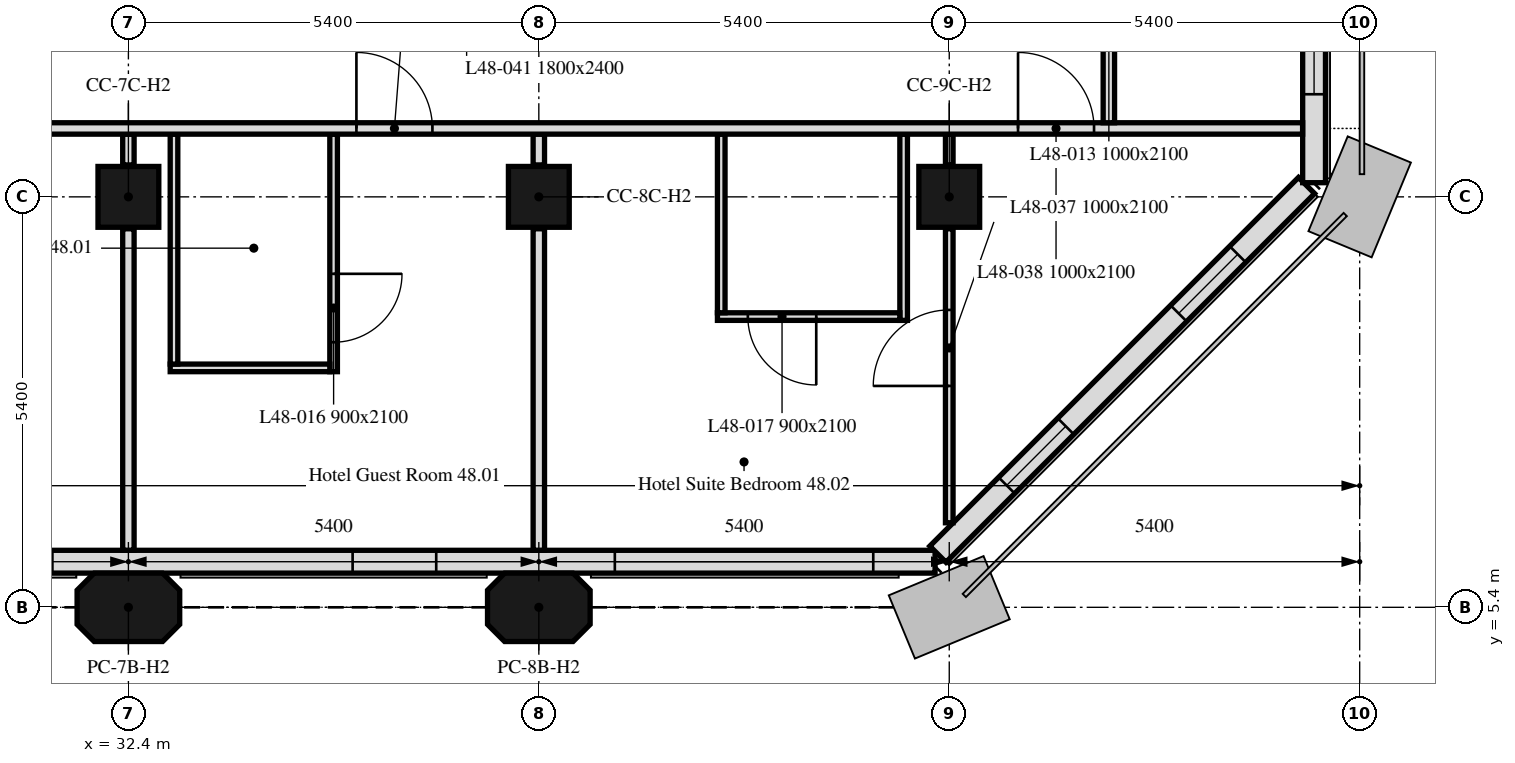
"""IFC4 building model, lengths in metres.
Left out: names, types, materials, properties, quantities, classifications, styles, units other than length and angle.
Written with IfcOpenShell. Run it as: python <this file> out.ifc"""

import sys

from ifc_helpers import new_model, si_unit, direction, frame, frame_2d, origin, origin_2d, place, context, subcontext, project, spatial, polyline, rectangle, outline, extrude, element, fill, save


model = new_model("IFC4")
c1 = context("Model", 3, precision=1e-05, world=origin(), true_north=direction((0.0, 1.0)))
c2 = subcontext(c1, "Body", "Model", "MODEL_VIEW")
j1 = project(units=[si_unit("LENGTHUNIT", "METRE"), si_unit("PLANEANGLEUNIT", "RADIAN")], contexts=[c1])
p1 = place(None, origin())
s1 = spatial("IfcSite", under=j1, at=p1, CompositionType="ELEMENT")
p2 = place(p1, origin())
s2 = spatial("IfcBuilding", under=s1, at=p2, CompositionType="ELEMENT")
p3 = place(p2, frame((0.0, 0.0, 197.2)))
s3 = spatial("IfcBuildingStorey", under=s2, at=p3, CompositionType="ELEMENT", Elevation=197.2)
for number, where, z_axis, x_axis in (
    (1, (32.4, 5.4, 0.0), (0.0, 0.0, 1.0), (1.0, 0.0, 0.0)),
    (2, (37.8, 5.4, 0.0), (0.0, 0.0, 1.0), (1.0, 0.0, 0.0)),
):
    element("IfcColumn", number, at=place(p3, frame(where, z_axis=z_axis, x_axis=x_axis)), inside=s3, PredefinedType="COLUMN", context=c2, shape_type="SweptSolid", body=[
        extrude(outline(polyline([(-0.45, -0.45), (0.45, -0.45), (0.675, -0.225), (0.675, 0.225), (0.45, 0.45), (-0.45, 0.45), (-0.675, 0.225), (-0.675, -0.225), (-0.45, -0.45)])), origin(), (0.0, 0.0, 1.0), 3.0),
    ])
for number, where, z_axis, x_axis in (
    (3, (32.4, 10.8, 0.0), (0.0, 0.0, 1.0), (1.0, 0.0, 0.0)),
    (4, (37.8, 10.8, 0.0), (0.0, 0.0, 1.0), (1.0, 0.0, 0.0)),
    (5, (43.2, 10.8, 0.0), (0.0, 0.0, 1.0), (1.0, 0.0, 0.0)),
):
    element("IfcColumn", number, at=place(p3, frame(where, z_axis=z_axis, x_axis=x_axis)), inside=s3, PredefinedType="COLUMN", context=c2, shape_type="SweptSolid", body=[
        extrude(rectangle(XDim=0.8, YDim=0.8, at=origin_2d()), origin(), (0.0, 0.0, 1.0), 3.0),
    ])
p4 = place(p3, frame((10.986, 6.0, 0.0), z_axis=(0.0, 0.0, 1.0), x_axis=(1.0, 0.0, 0.0)))
e6 = element("IfcWall", 6, at=p4, inside=s3, PredefinedType="SOLIDWALL", context=c2, shape_type="SweptSolid", body=[
    extrude(rectangle(XDim=32.027, YDim=0.3, at=frame_2d((16.014, 0.0))), origin(), (0.0, 0.0, 1.0), 3.0),
])
p5 = place(p4, frame((2.764, 0.0, 0.9)))
e7 = element("IfcOpeningElement", 7, at=p5, cuts=e6, PredefinedType="OPENING", context=c2, shape_type="SweptSolid", body=[
    extrude(rectangle(XDim=1.1, YDim=1.7, at=frame_2d((0.55, 0.85))), frame((0.0, 0.16, 0.0), z_axis=(0.0, -1.0, 0.0), x_axis=(1.0, 0.0, 0.0)), (0.0, 0.0, 1.0), 0.32),
])
p6 = place(p4, frame((6.214, 0.0, 0.9)))
e8 = element("IfcOpeningElement", 8, at=p6, cuts=e6, PredefinedType="OPENING", context=c2, shape_type="SweptSolid", body=[
    extrude(rectangle(XDim=3.4, YDim=1.7, at=frame_2d((1.7, 0.85))), frame((0.0, 0.16, 0.0), z_axis=(0.0, -1.0, 0.0), x_axis=(1.0, 0.0, 0.0)), (0.0, 0.0, 1.0), 0.32),
])
p7 = place(p4, frame((13.564, 0.0, 0.9)))
e9 = element("IfcOpeningElement", 9, at=p7, cuts=e6, PredefinedType="OPENING", context=c2, shape_type="SweptSolid", body=[
    extrude(rectangle(XDim=1.1, YDim=1.7, at=frame_2d((0.55, 0.85))), frame((0.0, 0.16, 0.0), z_axis=(0.0, -1.0, 0.0), x_axis=(1.0, 0.0, 0.0)), (0.0, 0.0, 1.0), 0.32),
])
p8 = place(p4, frame((17.014, 0.0, 0.9)))
e10 = element("IfcOpeningElement", 10, at=p8, cuts=e6, PredefinedType="OPENING", context=c2, shape_type="SweptSolid", body=[
    extrude(rectangle(XDim=3.4, YDim=1.7, at=frame_2d((1.7, 0.85))), frame((0.0, 0.16, 0.0), z_axis=(0.0, -1.0, 0.0), x_axis=(1.0, 0.0, 0.0)), (0.0, 0.0, 1.0), 0.32),
])
p9 = place(p4, frame((24.364, 0.0, 0.9)))
e11 = element("IfcOpeningElement", 11, at=p9, cuts=e6, PredefinedType="OPENING", context=c2, shape_type="SweptSolid", body=[
    extrude(rectangle(XDim=1.1, YDim=1.7, at=frame_2d((0.55, 0.85))), frame((0.0, 0.16, 0.0), z_axis=(0.0, -1.0, 0.0), x_axis=(1.0, 0.0, 0.0)), (0.0, 0.0, 1.0), 0.32),
])
p10 = place(p4, frame((27.814, 0.0, 0.9)))
e12 = element("IfcOpeningElement", 12, at=p10, cuts=e6, PredefinedType="OPENING", context=c2, shape_type="SweptSolid", body=[
    extrude(rectangle(XDim=3.4, YDim=1.7, at=frame_2d((1.7, 0.85))), frame((0.0, 0.16, 0.0), z_axis=(0.0, -1.0, 0.0), x_axis=(1.0, 0.0, 0.0)), (0.0, 0.0, 1.0), 0.32),
])
p11 = place(p3, frame((43.051, 6.099, 0.0), z_axis=(0.0, 0.0, 1.0), x_axis=(0.707106781187, 0.707106781187, 0.0)))
e13 = element("IfcWall", 13, at=p11, inside=s3, PredefinedType="SOLIDWALL", context=c2, shape_type="SweptSolid", body=[
    extrude(rectangle(XDim=6.86, YDim=0.3, at=frame_2d((3.43, 0.0))), origin(), (0.0, 0.0, 1.0), 3.0),
])
p12 = place(p11, frame((1.28, 0.0, 0.9)))
e14 = element("IfcOpeningElement", 14, at=p12, cuts=e13, PredefinedType="OPENING", context=c2, shape_type="SweptSolid", body=[
    extrude(rectangle(XDim=1.1, YDim=1.7, at=frame_2d((0.55, 0.85))), frame((0.0, 0.16, 0.0), z_axis=(0.0, -1.0, 0.0), x_axis=(1.0, 0.0, 0.0)), (0.0, 0.0, 1.0), 0.32),
])
p13 = place(p11, frame((4.48, 0.0, 0.9)))
e15 = element("IfcOpeningElement", 15, at=p13, cuts=e13, PredefinedType="OPENING", context=c2, shape_type="SweptSolid", body=[
    extrude(rectangle(XDim=1.1, YDim=1.7, at=frame_2d((0.55, 0.85))), frame((0.0, 0.16, 0.0), z_axis=(0.0, -1.0, 0.0), x_axis=(1.0, 0.0, 0.0)), (0.0, 0.0, 1.0), 0.32),
])
p14 = place(p3, frame((48.0, 10.986, 0.0), z_axis=(0.0, 0.0, 1.0), x_axis=(0.0, 1.0, 0.0)))
e16 = element("IfcWall", 16, at=p14, inside=s3, PredefinedType="SOLIDWALL", context=c2, shape_type="SweptSolid", body=[
    extrude(rectangle(XDim=32.027, YDim=0.3, at=frame_2d((16.014, 0.0))), origin(), (0.0, 0.0, 1.0), 3.0),
])
p15 = place(p14, frame((1.164, 0.0, 0.9)))
e17 = element("IfcOpeningElement", 17, at=p15, cuts=e16, PredefinedType="OPENING", context=c2, shape_type="SweptSolid", body=[
    extrude(rectangle(XDim=1.1, YDim=1.7, at=frame_2d((0.55, 0.85))), frame((0.0, 0.16, 0.0), z_axis=(0.0, -1.0, 0.0), x_axis=(1.0, 0.0, 0.0)), (0.0, 0.0, 1.0), 0.32),
])
p16 = place(p14, frame((2.764, 0.0, 0.9)))
e18 = element("IfcOpeningElement", 18, at=p16, cuts=e16, PredefinedType="OPENING", context=c2, shape_type="SweptSolid", body=[
    extrude(rectangle(XDim=1.1, YDim=1.7, at=frame_2d((0.55, 0.85))), frame((0.0, 0.16, 0.0), z_axis=(0.0, -1.0, 0.0), x_axis=(1.0, 0.0, 0.0)), (0.0, 0.0, 1.0), 0.32),
])
p17 = place(p14, frame((6.214, 0.0, 0.9)))
e19 = element("IfcOpeningElement", 19, at=p17, cuts=e16, PredefinedType="OPENING", context=c2, shape_type="SweptSolid", body=[
    extrude(rectangle(XDim=3.4, YDim=1.7, at=frame_2d((1.7, 0.85))), frame((0.0, 0.16, 0.0), z_axis=(0.0, -1.0, 0.0), x_axis=(1.0, 0.0, 0.0)), (0.0, 0.0, 1.0), 0.32),
])
p18 = place(p14, frame((11.964, 0.0, 0.9)))
e20 = element("IfcOpeningElement", 20, at=p18, cuts=e16, PredefinedType="OPENING", context=c2, shape_type="SweptSolid", body=[
    extrude(rectangle(XDim=1.1, YDim=1.7, at=frame_2d((0.55, 0.85))), frame((0.0, 0.16, 0.0), z_axis=(0.0, -1.0, 0.0), x_axis=(1.0, 0.0, 0.0)), (0.0, 0.0, 1.0), 0.32),
])
p19 = place(p14, frame((13.564, 0.0, 0.9)))
e21 = element("IfcOpeningElement", 21, at=p19, cuts=e16, PredefinedType="OPENING", context=c2, shape_type="SweptSolid", body=[
    extrude(rectangle(XDim=1.1, YDim=1.7, at=frame_2d((0.55, 0.85))), frame((0.0, 0.16, 0.0), z_axis=(0.0, -1.0, 0.0), x_axis=(1.0, 0.0, 0.0)), (0.0, 0.0, 1.0), 0.32),
])
p20 = place(p14, frame((17.014, 0.0, 0.9)))
e22 = element("IfcOpeningElement", 22, at=p20, cuts=e16, PredefinedType="OPENING", context=c2, shape_type="SweptSolid", body=[
    extrude(rectangle(XDim=3.4, YDim=1.7, at=frame_2d((1.7, 0.85))), frame((0.0, 0.16, 0.0), z_axis=(0.0, -1.0, 0.0), x_axis=(1.0, 0.0, 0.0)), (0.0, 0.0, 1.0), 0.32),
])
p21 = place(p14, frame((22.764, 0.0, 0.9)))
e23 = element("IfcOpeningElement", 23, at=p21, cuts=e16, PredefinedType="OPENING", context=c2, shape_type="SweptSolid", body=[
    extrude(rectangle(XDim=1.1, YDim=1.7, at=frame_2d((0.55, 0.85))), frame((0.0, 0.16, 0.0), z_axis=(0.0, -1.0, 0.0), x_axis=(1.0, 0.0, 0.0)), (0.0, 0.0, 1.0), 0.32),
])
p22 = place(p14, frame((24.364, 0.0, 0.9)))
e24 = element("IfcOpeningElement", 24, at=p22, cuts=e16, PredefinedType="OPENING", context=c2, shape_type="SweptSolid", body=[
    extrude(rectangle(XDim=1.1, YDim=1.7, at=frame_2d((0.55, 0.85))), frame((0.0, 0.16, 0.0), z_axis=(0.0, -1.0, 0.0), x_axis=(1.0, 0.0, 0.0)), (0.0, 0.0, 1.0), 0.32),
])
p23 = place(p14, frame((28.164, 0.0, 0.9)))
e25 = element("IfcOpeningElement", 25, at=p23, cuts=e16, PredefinedType="OPENING", context=c2, shape_type="SweptSolid", body=[
    extrude(rectangle(XDim=1.1, YDim=1.7, at=frame_2d((0.55, 0.85))), frame((0.0, 0.16, 0.0), z_axis=(0.0, -1.0, 0.0), x_axis=(1.0, 0.0, 0.0)), (0.0, 0.0, 1.0), 0.32),
])
p24 = place(p14, frame((29.589, 0.0, 0.9)))
e26 = element("IfcOpeningElement", 26, at=p24, cuts=e16, PredefinedType="OPENING", context=c2, shape_type="SweptSolid", body=[
    extrude(rectangle(XDim=0.65, YDim=1.7, at=frame_2d((0.325, 0.85))), frame((0.0, 0.16, 0.0), z_axis=(0.0, -1.0, 0.0), x_axis=(1.0, 0.0, 0.0)), (0.0, 0.0, 1.0), 0.32),
])
p25 = place(p3, frame((32.4, 6.151, 0.0), z_axis=(0.0, 0.0, 1.0), x_axis=(0.0, 1.0, 0.0)))
e27 = element("IfcWall", 27, at=p25, inside=s3, PredefinedType="PARTITIONING", context=c2, shape_type="SweptSolid", body=[
    extrude(rectangle(XDim=4.229, YDim=0.15, at=frame_2d((2.115, 0.0))), origin(), (0.0, 0.0, 1.0), 3.0),
])
p26 = place(p3, frame((32.4, 11.22, 0.0), z_axis=(0.0, 0.0, 1.0), x_axis=(0.0, 1.0, 0.0)))
e28 = element("IfcWall", 28, at=p26, inside=s3, PredefinedType="PARTITIONING", context=c2, shape_type="SweptSolid", body=[
    extrude(rectangle(XDim=0.405, YDim=0.15, at=frame_2d((0.203, 0.0))), origin(), (0.0, 0.0, 1.0), 3.0),
])
p27 = place(p3, frame((37.8, 6.151, 0.0), z_axis=(0.0, 0.0, 1.0), x_axis=(0.0, 1.0, 0.0)))
e29 = element("IfcWall", 29, at=p27, inside=s3, PredefinedType="PARTITIONING", context=c2, shape_type="SweptSolid", body=[
    extrude(rectangle(XDim=4.229, YDim=0.15, at=frame_2d((2.115, 0.0))), origin(), (0.0, 0.0, 1.0), 3.0),
])
p28 = place(p3, frame((37.8, 11.22, 0.0), z_axis=(0.0, 0.0, 1.0), x_axis=(0.0, 1.0, 0.0)))
e30 = element("IfcWall", 30, at=p28, inside=s3, PredefinedType="PARTITIONING", context=c2, shape_type="SweptSolid", body=[
    extrude(rectangle(XDim=0.405, YDim=0.15, at=frame_2d((0.203, 0.0))), origin(), (0.0, 0.0, 1.0), 3.0),
])
p29 = place(p3, frame((35.1, 11.625, 0.0), z_axis=(0.0, 0.0, 1.0), x_axis=(0.0, -1.0, 0.0)))
e31 = element("IfcWall", 31, at=p29, inside=s3, PredefinedType="PARTITIONING", context=c2, shape_type="SweptSolid", body=[
    extrude(rectangle(XDim=3.125, YDim=0.1, at=frame_2d((1.562, 0.0))), origin(), (0.0, 0.0, 1.0), 3.0),
])
p30 = place(p29, frame((1.837, 0.0, 0.0)))
e32 = element("IfcOpeningElement", 32, at=p30, cuts=e31, PredefinedType="OPENING", context=c2, shape_type="SweptSolid", body=[
    extrude(rectangle(XDim=0.9, YDim=2.1, at=frame_2d((0.45, 1.05))), frame((0.0, 0.05, 0.0), z_axis=(0.0, -1.0, 0.0), x_axis=(1.0, 0.0, 0.0)), (0.0, 0.0, 1.0), 0.1),
])
p31 = place(p3, frame((35.05, 8.55, 0.0), z_axis=(0.0, 0.0, 1.0), x_axis=(-1.0, 0.0, 0.0)))
e33 = element("IfcWall", 33, at=p31, inside=s3, PredefinedType="PARTITIONING", context=c2, shape_type="SweptSolid", body=[
    extrude(rectangle(XDim=2.1, YDim=0.1, at=frame_2d((1.05, 0.0))), origin(), (0.0, 0.0, 1.0), 3.0),
])
p32 = place(p3, frame((33.0, 8.6, 0.0), z_axis=(0.0, 0.0, 1.0), x_axis=(0.0, 1.0, 0.0)))
e34 = element("IfcWall", 34, at=p32, inside=s3, PredefinedType="PARTITIONING", context=c2, shape_type="SweptSolid", body=[
    extrude(rectangle(XDim=3.025, YDim=0.1, at=frame_2d((1.512, 0.0))), origin(), (0.0, 0.0, 1.0), 3.0),
])
p33 = place(p3, frame((43.2, 6.512, 0.0), z_axis=(0.0, 0.0, 1.0), x_axis=(0.0, 1.0, 0.0)))
e35 = element("IfcWall", 35, at=p33, inside=s3, PredefinedType="PARTITIONING", context=c2, shape_type="SweptSolid", body=[
    extrude(rectangle(XDim=3.868, YDim=0.1, at=frame_2d((1.934, 0.0))), origin(), (0.0, 0.0, 1.0), 3.0),
])
p34 = place(p33, frame((1.8, 0.0, 0.0)))
e36 = element("IfcOpeningElement", 36, at=p34, cuts=e35, PredefinedType="OPENING", context=c2, shape_type="SweptSolid", body=[
    extrude(rectangle(XDim=1.0, YDim=2.1, at=frame_2d((0.5, 1.05))), frame((0.0, 0.05, 0.0), z_axis=(0.0, -1.0, 0.0), x_axis=(1.0, 0.0, 0.0)), (0.0, 0.0, 1.0), 0.1),
])
p35 = place(p3, frame((43.2, 11.22, 0.0), z_axis=(0.0, 0.0, 1.0), x_axis=(0.0, 1.0, 0.0)))
e37 = element("IfcWall", 37, at=p35, inside=s3, PredefinedType="PARTITIONING", context=c2, shape_type="SweptSolid", body=[
    extrude(rectangle(XDim=0.405, YDim=0.1, at=frame_2d((0.203, 0.0))), origin(), (0.0, 0.0, 1.0), 3.0),
])
p36 = place(p3, frame((42.6, 11.625, 0.0), z_axis=(0.0, 0.0, 1.0), x_axis=(0.0, -1.0, 0.0)))
e38 = element("IfcWall", 38, at=p36, inside=s3, PredefinedType="PARTITIONING", context=c2, shape_type="SweptSolid", body=[
    extrude(rectangle(XDim=2.45, YDim=0.1, at=frame_2d((1.225, 0.0))), origin(), (0.0, 0.0, 1.0), 3.0),
])
p37 = place(p3, frame((42.55, 9.225, 0.0), z_axis=(0.0, 0.0, 1.0), x_axis=(-1.0, 0.0, 0.0)))
e39 = element("IfcWall", 39, at=p37, inside=s3, PredefinedType="PARTITIONING", context=c2, shape_type="SweptSolid", body=[
    extrude(rectangle(XDim=2.4, YDim=0.1, at=frame_2d((1.2, 0.0))), origin(), (0.0, 0.0, 1.0), 3.0),
])
p38 = place(p37, frame((1.1, 0.0, 0.0)))
e40 = element("IfcOpeningElement", 40, at=p38, cuts=e39, PredefinedType="OPENING", context=c2, shape_type="SweptSolid", body=[
    extrude(rectangle(XDim=0.9, YDim=2.1, at=frame_2d((0.45, 1.05))), frame((0.0, 0.05, 0.0), z_axis=(0.0, -1.0, 0.0), x_axis=(1.0, 0.0, 0.0)), (0.0, 0.0, 1.0), 0.1),
])
p39 = place(p3, frame((40.2, 9.275, 0.0), z_axis=(0.0, 0.0, 1.0), x_axis=(0.0, 1.0, 0.0)))
e41 = element("IfcWall", 41, at=p39, inside=s3, PredefinedType="PARTITIONING", context=c2, shape_type="SweptSolid", body=[
    extrude(rectangle(XDim=2.35, YDim=0.1, at=frame_2d((1.175, 0.0))), origin(), (0.0, 0.0, 1.0), 3.0),
])
p40 = place(p3, frame((6.151, 11.7, 0.0), z_axis=(0.0, 0.0, 1.0), x_axis=(1.0, 0.0, 0.0)))
e42 = element("IfcWall", 42, at=p40, inside=s3, PredefinedType="PARTITIONING", context=c2, shape_type="SweptSolid", body=[
    extrude(rectangle(XDim=41.698, YDim=0.15, at=frame_2d((20.849, 0.0))), origin(), (0.0, 0.0, 1.0), 3.0),
])
p41 = place(p40, frame((17.649, 0.0, 0.0)))
e43 = element("IfcOpeningElement", 43, at=p41, cuts=e42, PredefinedType="OPENING", context=c2, shape_type="SweptSolid", body=[
    extrude(rectangle(XDim=1.0, YDim=2.1, at=frame_2d((0.5, 1.05))), frame((0.0, 0.075, 0.0), z_axis=(0.0, -1.0, 0.0), x_axis=(1.0, 0.0, 0.0)), (0.0, 0.0, 1.0), 0.15),
])
p42 = place(p40, frame((1.449, 0.0, 0.0)))
e44 = element("IfcOpeningElement", 44, at=p42, cuts=e42, PredefinedType="OPENING", context=c2, shape_type="SweptSolid", body=[
    extrude(rectangle(XDim=1.0, YDim=2.1, at=frame_2d((0.5, 1.05))), frame((0.0, 0.075, 0.0), z_axis=(0.0, -1.0, 0.0), x_axis=(1.0, 0.0, 0.0)), (0.0, 0.0, 1.0), 0.15),
])
p43 = place(p40, frame((29.249, 0.0, 0.0)))
e45 = element("IfcOpeningElement", 45, at=p43, cuts=e42, PredefinedType="OPENING", context=c2, shape_type="SweptSolid", body=[
    extrude(rectangle(XDim=1.0, YDim=2.1, at=frame_2d((0.5, 1.05))), frame((0.0, 0.075, 0.0), z_axis=(0.0, -1.0, 0.0), x_axis=(1.0, 0.0, 0.0)), (0.0, 0.0, 1.0), 0.15),
])
p44 = place(p40, frame((37.954, 0.0, 0.0)))
e46 = element("IfcOpeningElement", 46, at=p44, cuts=e42, PredefinedType="OPENING", context=c2, shape_type="SweptSolid", body=[
    extrude(rectangle(XDim=1.0, YDim=2.1, at=frame_2d((0.5, 1.05))), frame((0.0, 0.075, 0.0), z_axis=(0.0, -1.0, 0.0), x_axis=(1.0, 0.0, 0.0)), (0.0, 0.0, 1.0), 0.15),
])
p45 = place(p3, frame((45.3, 41.325, 0.0), z_axis=(0.0, 0.0, 1.0), x_axis=(0.0, -1.0, 0.0)))
e47 = element("IfcWall", 47, at=p45, inside=s3, PredefinedType="PARTITIONING", context=c2, shape_type="SweptSolid", body=[
    extrude(rectangle(XDim=29.55, YDim=0.15, at=frame_2d((14.775, 0.0))), origin(), (0.0, 0.0, 1.0), 2.4),
])
p46 = place(p45, frame((5.467, 0.0, 0.0)))
e48 = element("IfcOpeningElement", 48, at=p46, cuts=e47, PredefinedType="OPENING", context=c2, shape_type="SweptSolid", body=[
    extrude(rectangle(XDim=1.0, YDim=2.1, at=frame_2d((0.5, 1.05))), frame((0.0, 0.075, 0.0), z_axis=(0.0, -1.0, 0.0), x_axis=(1.0, 0.0, 0.0)), (0.0, 0.0, 1.0), 0.15),
])
p47 = place(p45, frame((11.125, 0.0, 0.0)))
e49 = element("IfcOpeningElement", 49, at=p47, cuts=e47, PredefinedType="OPENING", context=c2, shape_type="SweptSolid", body=[
    extrude(rectangle(XDim=1.0, YDim=2.1, at=frame_2d((0.5, 1.05))), frame((0.0, 0.075, 0.0), z_axis=(0.0, -1.0, 0.0), x_axis=(1.0, 0.0, 0.0)), (0.0, 0.0, 1.0), 0.15),
])
p48 = place(p45, frame((26.875, 0.0, 0.0)))
e50 = element("IfcOpeningElement", 50, at=p48, cuts=e47, PredefinedType="OPENING", context=c2, shape_type="SweptSolid", body=[
    extrude(rectangle(XDim=1.0, YDim=2.1, at=frame_2d((0.5, 1.05))), frame((0.0, 0.075, 0.0), z_axis=(0.0, -1.0, 0.0), x_axis=(1.0, 0.0, 0.0)), (0.0, 0.0, 1.0), 0.15),
])
p49 = place(p45, frame((20.575, 0.0, 0.0)))
e51 = element("IfcOpeningElement", 51, at=p49, cuts=e47, PredefinedType="OPENING", context=c2, shape_type="SweptSolid", body=[
    extrude(rectangle(XDim=1.0, YDim=2.1, at=frame_2d((0.5, 1.05))), frame((0.0, 0.075, 0.0), z_axis=(0.0, -1.0, 0.0), x_axis=(1.0, 0.0, 0.0)), (0.0, 0.0, 1.0), 0.15),
])
p50 = place(p9, origin())
e52 = element("IfcWindow", 52, at=p50, inside=s3, PartitioningType="SINGLE_PANEL", PredefinedType="WINDOW", context=c2, shape_type="SweptSolid", body=[
    extrude(rectangle(XDim=1.1, YDim=1.7, at=frame_2d((0.55, 0.85))), frame((0.0, 0.03, 0.0), z_axis=(0.0, -1.0, 0.0), x_axis=(1.0, 0.0, 0.0)), (0.0, 0.0, 1.0), 0.06),
])
fill(e11, e52)
p51 = place(p10, origin())
e53 = element("IfcWindow", 53, at=p51, inside=s3, PartitioningType="SINGLE_PANEL", PredefinedType="WINDOW", context=c2, shape_type="SweptSolid", body=[
    extrude(rectangle(XDim=3.4, YDim=1.7, at=frame_2d((1.7, 0.85))), frame((0.0, 0.03, 0.0), z_axis=(0.0, -1.0, 0.0), x_axis=(1.0, 0.0, 0.0)), (0.0, 0.0, 1.0), 0.06),
])
fill(e12, e53)
p52 = place(p12, origin())
e54 = element("IfcWindow", 54, at=p52, inside=s3, PartitioningType="SINGLE_PANEL", PredefinedType="WINDOW", context=c2, shape_type="SweptSolid", body=[
    extrude(rectangle(XDim=1.1, YDim=1.7, at=frame_2d((0.55, 0.85))), frame((0.0, 0.03, 0.0), z_axis=(0.0, -1.0, 0.0), x_axis=(1.0, 0.0, 0.0)), (0.0, 0.0, 1.0), 0.06),
])
fill(e14, e54)
p53 = place(p13, origin())
e55 = element("IfcWindow", 55, at=p53, inside=s3, PartitioningType="SINGLE_PANEL", PredefinedType="WINDOW", context=c2, shape_type="SweptSolid", body=[
    extrude(rectangle(XDim=1.1, YDim=1.7, at=frame_2d((0.55, 0.85))), frame((0.0, 0.03, 0.0), z_axis=(0.0, -1.0, 0.0), x_axis=(1.0, 0.0, 0.0)), (0.0, 0.0, 1.0), 0.06),
])
fill(e15, e55)
p54 = place(p15, origin())
e56 = element("IfcWindow", 56, at=p54, inside=s3, PartitioningType="SINGLE_PANEL", PredefinedType="WINDOW", context=c2, shape_type="SweptSolid", body=[
    extrude(rectangle(XDim=1.1, YDim=1.7, at=frame_2d((0.55, 0.85))), frame((0.0, 0.03, 0.0), z_axis=(0.0, -1.0, 0.0), x_axis=(1.0, 0.0, 0.0)), (0.0, 0.0, 1.0), 0.06),
])
fill(e17, e56)
p55 = place(p30, origin())
e57 = element("IfcDoor", 57, at=p55, inside=s3, OperationType="SINGLE_SWING_LEFT", PredefinedType="DOOR", context=c2, shape_type="SweptSolid", body=[
    extrude(rectangle(XDim=0.9, YDim=2.1, at=frame_2d((0.45, 1.05))), frame((0.0, 0.025, 0.0), z_axis=(0.0, -1.0, 0.0), x_axis=(1.0, 0.0, 0.0)), (0.0, 0.0, 1.0), 0.05),
])
fill(e32, e57)
p56 = place(p38, origin())
e58 = element("IfcDoor", 58, at=p56, inside=s3, OperationType="SINGLE_SWING_LEFT", PredefinedType="DOOR", context=c2, shape_type="SweptSolid", body=[
    extrude(rectangle(XDim=0.9, YDim=2.1, at=frame_2d((0.45, 1.05))), frame((0.0, 0.025, 0.0), z_axis=(0.0, -1.0, 0.0), x_axis=(1.0, 0.0, 0.0)), (0.0, 0.0, 1.0), 0.05),
])
fill(e40, e58)
p57 = place(p43, origin())
e59 = element("IfcDoor", 59, at=p57, inside=s3, OperationType="SINGLE_SWING_LEFT", PredefinedType="DOOR", context=c2, shape_type="SweptSolid", body=[
    extrude(rectangle(XDim=1.0, YDim=2.1, at=frame_2d((0.5, 1.05))), frame((0.0, 0.025, 0.0), z_axis=(0.0, -1.0, 0.0), x_axis=(1.0, 0.0, 0.0)), (0.0, 0.0, 1.0), 0.05),
])
fill(e45, e59)
p58 = place(p34, origin())
e60 = element("IfcDoor", 60, at=p58, inside=s3, OperationType="SINGLE_SWING_LEFT", PredefinedType="DOOR", context=c2, shape_type="SweptSolid", body=[
    extrude(rectangle(XDim=1.0, YDim=2.1, at=frame_2d((0.5, 1.05))), frame((0.0, 0.025, 0.0), z_axis=(0.0, -1.0, 0.0), x_axis=(1.0, 0.0, 0.0)), (0.0, 0.0, 1.0), 0.05),
])
fill(e36, e60)
p59 = place(p44, origin())
e61 = element("IfcDoor", 61, at=p59, inside=s3, OperationType="SINGLE_SWING_LEFT", PredefinedType="DOOR", context=c2, shape_type="SweptSolid", body=[
    extrude(rectangle(XDim=1.0, YDim=2.1, at=frame_2d((0.5, 1.05))), frame((0.0, 0.025, 0.0), z_axis=(0.0, -1.0, 0.0), x_axis=(1.0, 0.0, 0.0)), (0.0, 0.0, 1.0), 0.05),
])
fill(e46, e61)
save(model, sys.argv[1])
